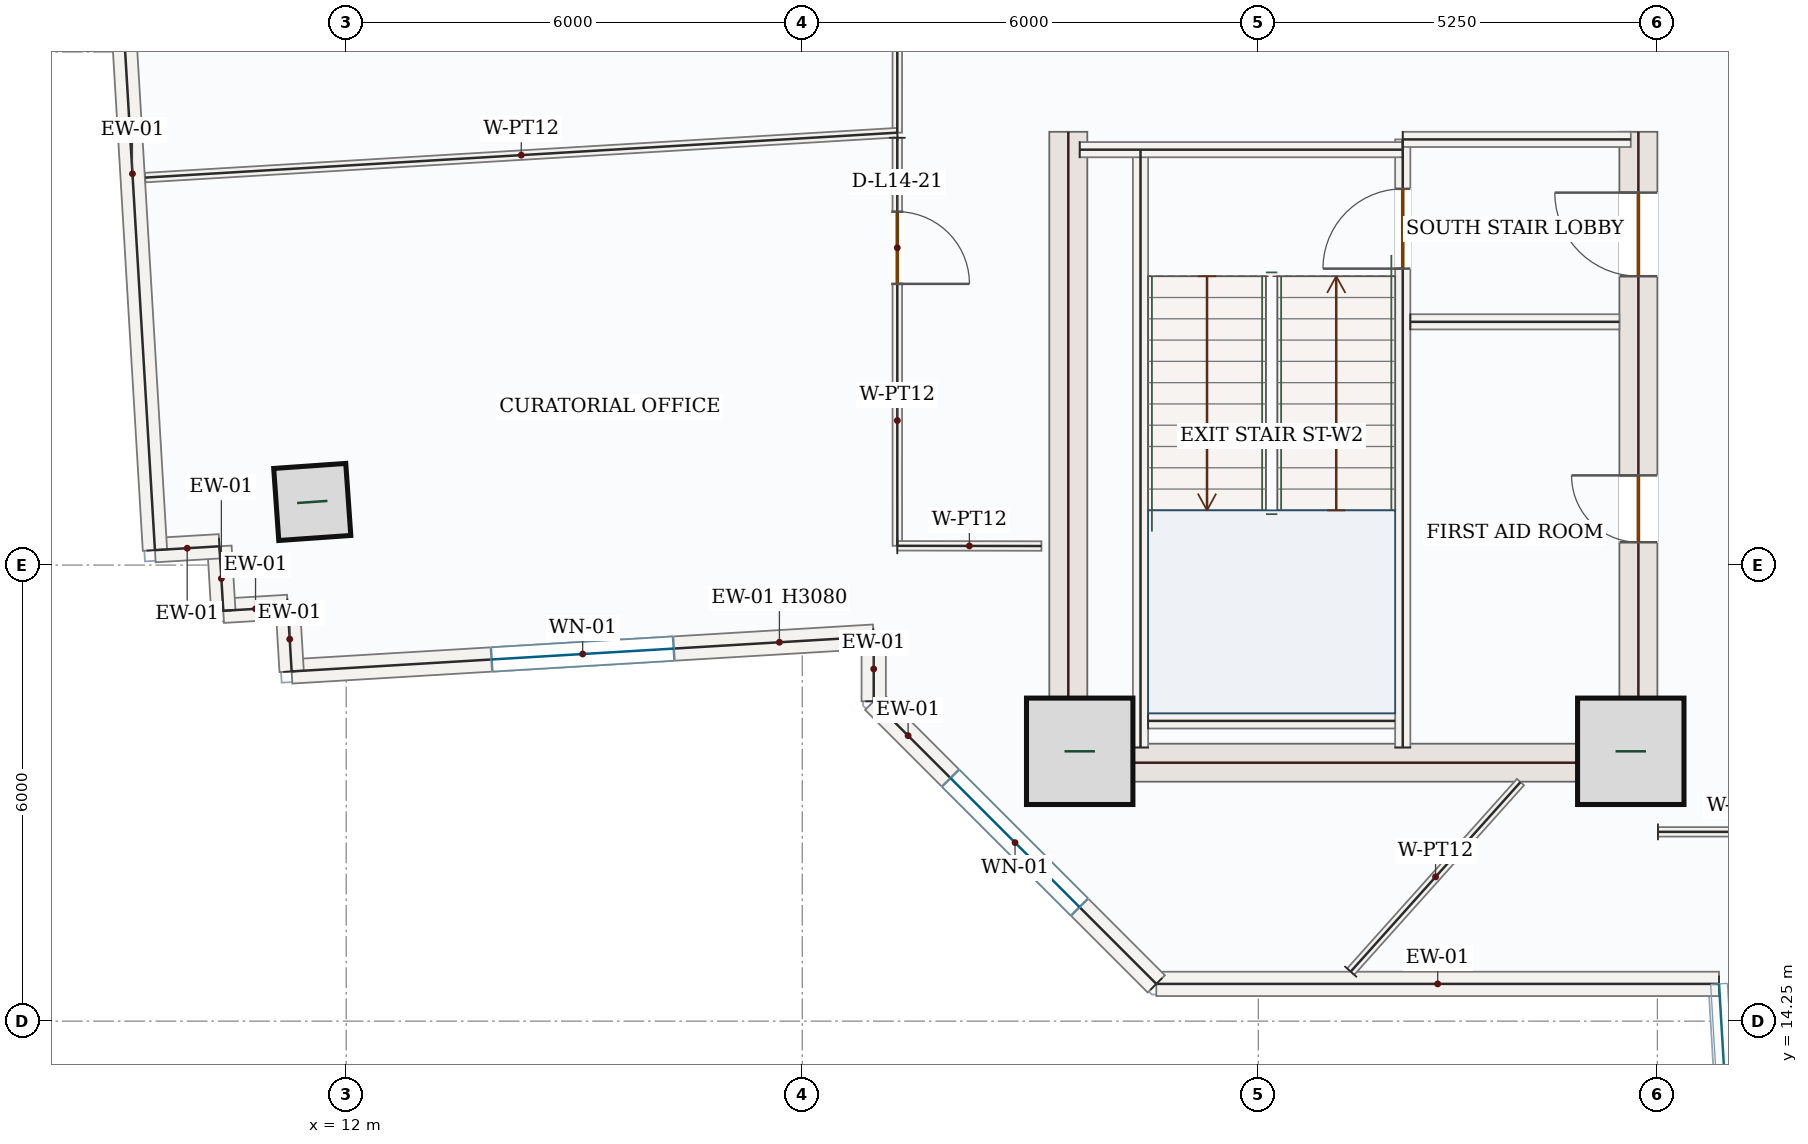
"""IFC4 building model, lengths in metres.
Left out: names, types, materials, properties, quantities, classifications, styles, units other than length and angle.
Written with IfcOpenShell. Run it as: python <this file> out.ifc"""

import sys

from ifc_helpers import new_model, si_unit, direction, frame, frame_2d, origin, origin_2d, place, context, subcontext, project, spatial, rectangle, hollow_rectangle, extrude, source, transform, mapped, element, fill, save


model = new_model("IFC4")
c1 = context("Model", 3, precision=1e-05, world=origin(), true_north=direction((0.0, 1.0)))
c2 = subcontext(c1, "Body", "Model", "MODEL_VIEW")
j1 = project(units=[si_unit("LENGTHUNIT", "METRE"), si_unit("PLANEANGLEUNIT", "RADIAN")], contexts=[c1])
p1 = place(None, origin())
s1 = spatial("IfcSite", under=j1, at=p1, CompositionType="ELEMENT")
p2 = place(p1, origin())
s2 = spatial("IfcBuilding", under=s1, at=p2, CompositionType="ELEMENT")
p3 = place(p2, frame((0.0, 0.0, 66.9)))
s3 = spatial("IfcBuildingStorey", under=s2, at=p3, CompositionType="ELEMENT", Elevation=66.9)
m1 = source(origin(), c2, "Body", "SweptSolid", [
    extrude(rectangle(XDim=8.55, YDim=0.5, at=frame_2d((4.275, 0.0))), origin(), (0.0, 0.0, 1.0), 3.95),
])
p4 = place(p3, frame((21.5, 17.4, 0.0), z_axis=(0.0, 0.0, 1.0), x_axis=(0.0, 1.0, 0.0)))
e1 = element("IfcWall", 1, at=p4, inside=s3, PredefinedType="SHEAR", context=c2, shape_type="MappedRepresentation", body=[
    mapped(m1, transform((0.0, 0.0, 0.0), x_axis=(1.0, 0.0, 0.0), y_axis=(0.0, 1.0, 0.0), z_axis=(0.0, 0.0, 1.0), scale=1.0)),
])
p5 = place(p3, frame((29.0, 17.4, 0.0), z_axis=(0.0, 0.0, 1.0), x_axis=(0.0, 1.0, 0.0)))
e2 = element("IfcWall", 2, at=p5, inside=s3, PredefinedType="SHEAR", context=c2, shape_type="SweptSolid", body=[
    extrude(rectangle(XDim=8.55, YDim=0.5, at=frame_2d((4.275, 0.0))), origin(), (0.0, 0.0, 1.0), 3.95),
])
p6 = place(p5, frame((6.65, 0.0, 0.0)))
e3 = element("IfcOpeningElement", 3, at=p6, cuts=e2, PredefinedType="OPENING", context=c2, shape_type="SweptSolid", body=[
    extrude(rectangle(XDim=1.1, YDim=2.2, at=frame_2d((0.55, 1.1))), frame((0.0, 0.26, 0.0), z_axis=(0.0, -1.0, 0.0), x_axis=(1.0, 0.0, 0.0)), (0.0, 0.0, 1.0), 0.52),
])
p7 = place(p5, frame((3.15, 0.0, 0.0)))
e4 = element("IfcOpeningElement", 4, at=p7, cuts=e2, PredefinedType="OPENING", context=c2, shape_type="SweptSolid", body=[
    extrude(rectangle(XDim=0.88, YDim=2.1, at=frame_2d((0.44, 1.05))), frame((0.0, 0.26, 0.0), z_axis=(0.0, -1.0, 0.0), x_axis=(1.0, 0.0, 0.0)), (0.0, 0.0, 1.0), 0.52),
])
m2 = source(origin(), c2, "Body", "SweptSolid", [
    extrude(rectangle(XDim=7.0, YDim=0.5, at=frame_2d((3.5, 0.0))), origin(), (0.0, 0.0, 1.0), 3.95),
])
p8 = place(p3, frame((21.75, 17.65, 0.0), z_axis=(0.0, 0.0, 1.0), x_axis=(1.0, 0.0, 0.0)))
e5 = element("IfcWall", 5, at=p8, inside=s3, PredefinedType="SHEAR", context=c2, shape_type="MappedRepresentation", body=[
    mapped(m2, transform((0.0, 0.0, 0.0), x_axis=(1.0, 0.0, 0.0), y_axis=(0.0, 1.0, 0.0), z_axis=(0.0, 0.0, 1.0), scale=1.0)),
])
m3 = source(origin(), c2, "Body", "SweptSolid", [
    extrude(rectangle(XDim=1.4, YDim=1.4, at=origin_2d()), origin(), (0.0, 0.0, 1.0), 4.2),
])
for number, where, z_axis, x_axis in (
    (6, (21.65, 17.8, 0.0), (0.0, 0.0, 1.0), (1.0, 0.0, 0.0)),
    (7, (28.9, 17.8, 0.0), (0.0, 0.0, 1.0), (1.0, 0.0, 0.0)),
):
    element("IfcColumn", number, at=place(p3, frame(where, z_axis=z_axis, x_axis=x_axis)), inside=s3, PredefinedType="COLUMN", context=c2, shape_type="MappedRepresentation", body=[
        mapped(m3, transform((0.0, 0.0, 0.0), x_axis=(1.0, 0.0, 0.0), y_axis=(0.0, 1.0, 0.0), z_axis=(0.0, 0.0, 1.0), scale=1.0)),
    ])
m4 = source(origin(), c2, "Body", "SweptSolid", [
    extrude(hollow_rectangle(XDim=0.95, YDim=0.95, WallThickness=0.05, at=origin_2d()), origin(), (0.0, 0.0, 1.0), 4.2),
])
p9 = place(p3, frame((11.553, 21.08, 0.0), z_axis=(0.0, 0.0, 1.0), x_axis=(0.99756405026, 0.069756473744, 0.0)))
e8 = element("IfcColumn", 8, at=p9, inside=s3, PredefinedType="COLUMN", context=c2, shape_type="MappedRepresentation", body=[
    mapped(m4, transform((0.0, 0.0, 0.0), x_axis=(1.0, 0.0, 0.0), y_axis=(0.0, 1.0, 0.0), z_axis=(0.0, 0.0, 1.0), scale=1.0)),
])
m5 = source(origin(), c2, "Body", "SweptSolid", [
    extrude(rectangle(XDim=7.403, YDim=0.32, at=frame_2d((3.701, 0.0))), origin(), (0.0, 0.0, 1.0), 3.95),
])
p10 = place(p3, frame((30.061, 14.74, 0.0), z_axis=(0.0, 0.0, 1.0), x_axis=(-1.0, 0.0, 0.0)))
e9 = element("IfcWall", 9, at=p10, inside=s3, PredefinedType="SOLIDWALL", context=c2, shape_type="MappedRepresentation", body=[
    mapped(m5, transform((0.0, 0.0, 0.0), x_axis=(1.0, 0.0, 0.0), y_axis=(0.0, 1.0, 0.0), z_axis=(0.0, 0.0, 1.0), scale=1.0)),
])
p11 = place(p3, frame((22.658, 14.74, 0.0), z_axis=(0.0, 0.0, 1.0), x_axis=(-0.707106781187, 0.707106781187, 0.0)))
e10 = element("IfcWall", 10, at=p11, inside=s3, PredefinedType="SOLIDWALL", context=c2, shape_type="SweptSolid", body=[
    extrude(rectangle(XDim=5.258, YDim=0.32, at=frame_2d((2.629, 0.0))), origin(), (0.0, 0.0, 1.0), 3.95),
])
p12 = place(p11, frame((1.429, 0.0, 0.85)))
e11 = element("IfcOpeningElement", 11, at=p12, cuts=e10, PredefinedType="OPENING", context=c2, shape_type="SweptSolid", body=[
    extrude(rectangle(XDim=2.4, YDim=1.8, at=frame_2d((1.2, 0.9))), frame((0.0, 0.17, 0.0), z_axis=(0.0, -1.0, 0.0), x_axis=(1.0, 0.0, 0.0)), (0.0, 0.0, 1.0), 0.34),
])
m6 = source(origin(), c2, "Body", "SweptSolid", [
    extrude(rectangle(XDim=0.851, YDim=0.32, at=frame_2d((0.425, 0.0))), origin(), (0.0, 0.0, 1.0), 3.95),
])
p13 = place(p3, frame((18.94, 18.458, 0.0), z_axis=(0.0, 0.0, 1.0), x_axis=(0.0, 1.0, 0.0)))
e12 = element("IfcWall", 12, at=p13, inside=s3, PredefinedType="SOLIDWALL", context=c2, shape_type="MappedRepresentation", body=[
    mapped(m6, transform((0.0, 0.0, 0.0), x_axis=(1.0, 0.0, 0.0), y_axis=(0.0, 1.0, 0.0), z_axis=(0.0, 0.0, 1.0), scale=1.0)),
])
p14 = place(p3, frame((18.94, 19.309, 0.0), z_axis=(0.0, 0.0, 1.0), x_axis=(-0.998218176762, -0.059669687296, 0.0)))
e13 = element("IfcWall", 13, at=p14, inside=s3, PredefinedType="SOLIDWALL", context=c2, shape_type="SweptSolid", body=[
    extrude(rectangle(XDim=7.672, YDim=0.32, at=frame_2d((3.836, 0.0))), origin(), (0.0, 0.0, 1.0), 3.08),
])
p15 = place(p14, frame((2.636, 0.0, 0.85)))
e14 = element("IfcOpeningElement", 14, at=p15, cuts=e13, PredefinedType="OPENING", context=c2, shape_type="SweptSolid", body=[
    extrude(rectangle(XDim=2.4, YDim=1.8, at=frame_2d((1.2, 0.9))), frame((0.0, 0.17, 0.0), z_axis=(0.0, -1.0, 0.0), x_axis=(1.0, 0.0, 0.0)), (0.0, 0.0, 1.0), 0.34),
])
m7 = source(origin(), c2, "Body", "SweptSolid", [
    extrude(rectangle(XDim=0.85, YDim=0.32, at=frame_2d((0.425, 0.0))), origin(), (0.0, 0.0, 1.0), 3.95),
])
for number, where, z_axis, x_axis in (
    (15, (11.282, 18.851, 0.0), (0.0, 0.0, 1.0), (-0.059, 0.998, 0.0)),
    (16, (11.231, 19.699, 0.0), (0.0, 0.0, 1.0), (-0.998, -0.06, 0.0)),
    (17, (10.383, 19.649, 0.0), (0.0, 0.0, 1.0), (-0.059, 0.998, 0.0)),
    (18, (10.332, 20.497, 0.0), (0.0, 0.0, 1.0), (-0.998, -0.06, 0.0)),
):
    element("IfcWall", number, at=place(p3, frame(where, z_axis=z_axis, x_axis=x_axis)), inside=s3, PredefinedType="SOLIDWALL", context=c2, shape_type="MappedRepresentation", body=[
        mapped(m7, transform((0.0, 0.0, 0.0), x_axis=(1.0, 0.0, 0.0), y_axis=(0.0, 1.0, 0.0), z_axis=(0.0, 0.0, 1.0), scale=1.0)),
    ])
m8 = source(origin(), c2, "Body", "SweptSolid", [
    extrude(rectangle(XDim=9.92, YDim=0.32, at=frame_2d((4.96, 0.0))), origin(), (0.0, 0.0, 1.0), 3.95),
])
p16 = place(p3, frame((9.484, 20.447, 0.0), z_axis=(0.0, 0.0, 1.0), x_axis=(-0.059656871726, 0.998218942745, 0.0)))
e19 = element("IfcWall", 19, at=p16, inside=s3, PredefinedType="SOLIDWALL", context=c2, shape_type="MappedRepresentation", body=[
    mapped(m8, transform((0.0, 0.0, 0.0), x_axis=(1.0, 0.0, 0.0), y_axis=(0.0, 1.0, 0.0), z_axis=(0.0, 0.0, 1.0), scale=1.0)),
])
m9 = source(origin(), c2, "Body", "SweptSolid", [
    extrude(rectangle(XDim=7.87, YDim=0.2, at=frame_2d((3.935, 0.0))), origin(), (0.0, 0.0, 1.0), 3.95),
])
p17 = place(p3, frame((22.45, 17.85, 0.0), z_axis=(0.0, 0.0, 1.0), x_axis=(0.0, 1.0, 0.0)))
e20 = element("IfcWall", 20, at=p17, inside=s3, PredefinedType="SOLIDWALL", context=c2, shape_type="MappedRepresentation", body=[
    mapped(m9, transform((0.0, 0.0, 0.0), x_axis=(1.0, 0.0, 0.0), y_axis=(0.0, 1.0, 0.0), z_axis=(0.0, 0.0, 1.0), scale=1.0)),
])
p18 = place(p3, frame((25.9, 17.85, 0.0), z_axis=(0.0, 0.0, 1.0), x_axis=(0.0, 1.0, 0.0)))
e21 = element("IfcWall", 21, at=p18, inside=s3, PredefinedType="SOLIDWALL", context=c2, shape_type="SweptSolid", body=[
    extrude(rectangle(XDim=8.0, YDim=0.2, at=frame_2d((4.0, 0.0))), origin(), (0.0, 0.0, 1.0), 3.95),
])
p19 = place(p18, frame((6.3, 0.0, 0.0)))
e22 = element("IfcOpeningElement", 22, at=p19, cuts=e21, PredefinedType="OPENING", context=c2, shape_type="SweptSolid", body=[
    extrude(rectangle(XDim=1.05, YDim=2.15, at=frame_2d((0.525, 1.075))), frame((0.0, 0.11, 0.0), z_axis=(0.0, -1.0, 0.0), x_axis=(1.0, 0.0, 0.0)), (0.0, 0.0, 1.0), 0.22),
])
m10 = source(origin(), c2, "Body", "SweptSolid", [
    extrude(rectangle(XDim=4.25, YDim=0.2, at=frame_2d((2.125, 0.0))), origin(), (0.0, 0.0, 1.0), 3.95),
])
p20 = place(p3, frame((21.65, 25.715, 0.0), z_axis=(0.0, 0.0, 1.0), x_axis=(1.0, 0.0, 0.0)))
e23 = element("IfcWall", 23, at=p20, inside=s3, PredefinedType="SOLIDWALL", context=c2, shape_type="MappedRepresentation", body=[
    mapped(m10, transform((0.0, 0.0, 0.0), x_axis=(1.0, 0.0, 0.0), y_axis=(0.0, 1.0, 0.0), z_axis=(0.0, 0.0, 1.0), scale=1.0)),
])
m11 = source(origin(), c2, "Body", "SweptSolid", [
    extrude(rectangle(XDim=3.0, YDim=0.2, at=frame_2d((1.5, 0.0))), origin(), (0.0, 0.0, 1.0), 3.95),
])
p21 = place(p3, frame((25.9, 25.85, 0.0), z_axis=(0.0, 0.0, 1.0), x_axis=(1.0, 0.0, 0.0)))
e24 = element("IfcWall", 24, at=p21, inside=s3, PredefinedType="SOLIDWALL", context=c2, shape_type="MappedRepresentation", body=[
    mapped(m11, transform((0.0, 0.0, 0.0), x_axis=(1.0, 0.0, 0.0), y_axis=(0.0, 1.0, 0.0), z_axis=(0.0, 0.0, 1.0), scale=1.0)),
])
m12 = source(origin(), c2, "Body", "SweptSolid", [
    extrude(rectangle(XDim=3.25, YDim=0.2, at=frame_2d((1.625, 0.0))), origin(), (0.0, 0.0, 1.0), 3.95),
])
p22 = place(p3, frame((22.55, 18.2, 0.0), z_axis=(0.0, 0.0, 1.0), x_axis=(1.0, 0.0, 0.0)))
e25 = element("IfcWall", 25, at=p22, inside=s3, PredefinedType="SOLIDWALL", context=c2, shape_type="MappedRepresentation", body=[
    mapped(m12, transform((0.0, 0.0, 0.0), x_axis=(1.0, 0.0, 0.0), y_axis=(0.0, 1.0, 0.0), z_axis=(0.0, 0.0, 1.0), scale=1.0)),
])
m13 = source(origin(), c2, "Body", "SweptSolid", [
    extrude(rectangle(XDim=2.75, YDim=0.2, at=frame_2d((1.375, 0.0))), origin(), (0.0, 0.0, 1.0), 3.95),
])
p23 = place(p3, frame((26.0, 23.45, 0.0), z_axis=(0.0, 0.0, 1.0), x_axis=(1.0, 0.0, 0.0)))
e26 = element("IfcWall", 26, at=p23, inside=s3, PredefinedType="SOLIDWALL", context=c2, shape_type="MappedRepresentation", body=[
    mapped(m13, transform((0.0, 0.0, 0.0), x_axis=(1.0, 0.0, 0.0), y_axis=(0.0, 1.0, 0.0), z_axis=(0.0, 0.0, 1.0), scale=1.0)),
])
p24 = place(p3, frame((29.258, 16.74, 0.0), z_axis=(0.0, 0.0, 1.0), x_axis=(0.999999998192, -6.0135907e-05, 0.0)))
e27 = element("IfcWall", 27, at=p24, inside=s3, PredefinedType="PARTITIONING", context=c2, shape_type="SweptSolid", body=[
    extrude(rectangle(XDim=4.06, YDim=0.125, at=frame_2d((2.03, 0.0))), origin(), (0.0, 0.0, 1.0), 3.95),
])
p25 = place(p24, frame((2.426, 0.0, 0.0)))
e28 = element("IfcOpeningElement", 28, at=p25, cuts=e27, PredefinedType="OPENING", context=c2, shape_type="SweptSolid", body=[
    extrude(rectangle(XDim=0.95, YDim=2.15, at=frame_2d((0.475, 1.075))), frame((0.0, 0.073, 0.0), z_axis=(0.0, -1.0, 0.0), x_axis=(1.0, 0.0, 0.0)), (0.0, 0.0, 1.0), 0.145),
])
m14 = source(origin(), c2, "Body", "SweptSolid", [
    extrude(rectangle(XDim=3.348, YDim=0.125, at=frame_2d((1.674, 0.0))), origin(), (0.0, 0.0, 1.0), 3.95),
])
p26 = place(p3, frame((25.215, 14.901, 0.0), z_axis=(0.0, 0.0, 1.0), x_axis=(0.667206176518, 0.74487308853, 0.0)))
e29 = element("IfcWall", 29, at=p26, inside=s3, PredefinedType="PARTITIONING", context=c2, shape_type="MappedRepresentation", body=[
    mapped(m14, transform((0.0, 0.0, 0.0), x_axis=(1.0, 0.0, 0.0), y_axis=(0.0, 1.0, 0.0), z_axis=(0.0, 0.0, 1.0), scale=1.0)),
])
p27 = place(p3, frame((19.253, 33.497, 0.0), z_axis=(0.0, 0.0, 1.0), x_axis=(-0.000355308612, -0.999999936878, 0.0)))
e30 = element("IfcWall", 30, at=p27, inside=s3, PredefinedType="PARTITIONING", context=c2, shape_type="SweptSolid", body=[
    extrude(rectangle(XDim=7.558, YDim=0.125, at=frame_2d((3.779, 0.0))), origin(), (0.0, 0.0, 1.0), 3.95),
])
p28 = place(p27, frame((5.155, 0.0, 0.0)))
e31 = element("IfcOpeningElement", 31, at=p28, cuts=e30, PredefinedType="OPENING", context=c2, shape_type="SweptSolid", body=[
    extrude(rectangle(XDim=0.95, YDim=2.15, at=frame_2d((0.475, 1.075))), frame((0.0, 0.073, 0.0), z_axis=(0.0, -1.0, 0.0), x_axis=(1.0, 0.0, 0.0)), (0.0, 0.0, 1.0), 0.145),
])
m15 = source(origin(), c2, "Body", "SweptSolid", [
    extrude(rectangle(XDim=9.911, YDim=0.125, at=frame_2d((4.956, 0.0))), origin(), (0.0, 0.0, 1.0), 3.95),
])
p29 = place(p3, frame((19.25, 25.939, 0.0), z_axis=(0.0, 0.0, 1.0), x_axis=(-0.998218808208, -0.05965912285, 0.0)))
e32 = element("IfcWall", 32, at=p29, inside=s3, PredefinedType="PARTITIONING", context=c2, shape_type="MappedRepresentation", body=[
    mapped(m15, transform((0.0, 0.0, 0.0), x_axis=(1.0, 0.0, 0.0), y_axis=(0.0, 1.0, 0.0), z_axis=(0.0, 0.0, 1.0), scale=1.0)),
])
p30 = place(p3, frame((19.25, 25.871, 0.0), z_axis=(0.0, 0.0, 1.0), x_axis=(9.0962841e-05, -0.999999995863, 0.0)))
e33 = element("IfcWall", 33, at=p30, inside=s3, PredefinedType="PARTITIONING", context=c2, shape_type="SweptSolid", body=[
    extrude(rectangle(XDim=5.368, YDim=0.125, at=frame_2d((2.684, 0.0))), origin(), (0.0, 0.0, 1.0), 3.95),
])
p31 = place(p30, frame((0.972, 0.0, 0.0)))
e34 = element("IfcOpeningElement", 34, at=p31, cuts=e33, PredefinedType="OPENING", context=c2, shape_type="SweptSolid", body=[
    extrude(rectangle(XDim=0.95, YDim=2.15, at=frame_2d((0.475, 1.075))), frame((0.0, 0.073, 0.0), z_axis=(0.0, -1.0, 0.0), x_axis=(1.0, 0.0, 0.0)), (0.0, 0.0, 1.0), 0.145),
])
m16 = source(origin(), c2, "Body", "SweptSolid", [
    extrude(rectangle(XDim=1.896, YDim=0.125, at=frame_2d((0.948, 0.0))), origin(), (0.0, 0.0, 1.0), 3.95),
])
p32 = place(p3, frame((19.25, 20.503, 0.0), z_axis=(0.0, 0.0, 1.0), x_axis=(0.999998806185, -0.001545195168, 0.0)))
e35 = element("IfcWall", 35, at=p32, inside=s3, PredefinedType="PARTITIONING", context=c2, shape_type="MappedRepresentation", body=[
    mapped(m16, transform((0.0, 0.0, 0.0), x_axis=(1.0, 0.0, 0.0), y_axis=(0.0, 1.0, 0.0), z_axis=(0.0, 0.0, 1.0), scale=1.0)),
])
m17 = source(origin(), c2, "Body", "SweptSolid", [
    extrude(rectangle(XDim=2.4, YDim=1.8, at=frame_2d((1.2, 0.9))), frame((0.0, 0.03, 0.0), z_axis=(0.0, -1.0, 0.0), x_axis=(1.0, 0.0, 0.0)), (0.0, 0.0, 1.0), 0.06),
])
p33 = place(p12, origin())
e36 = element("IfcWindow", 36, at=p33, inside=s3, PartitioningType="DOUBLE_PANEL_VERTICAL", PredefinedType="WINDOW", context=c2, shape_type="MappedRepresentation", body=[
    mapped(m17, transform((0.0, 0.0, 0.0), x_axis=(1.0, 0.0, 0.0), y_axis=(0.0, 1.0, 0.0), z_axis=(0.0, 0.0, 1.0), scale=1.0)),
])
fill(e11, e36)
p34 = place(p15, origin())
e37 = element("IfcWindow", 37, at=p34, inside=s3, PartitioningType="DOUBLE_PANEL_VERTICAL", PredefinedType="WINDOW", context=c2, shape_type="MappedRepresentation", body=[
    mapped(m17, transform((0.0, 0.0, 0.0), x_axis=(1.0, 0.0, 0.0), y_axis=(0.0, 1.0, 0.0), z_axis=(0.0, 0.0, 1.0), scale=1.0)),
])
fill(e14, e37)
m18 = source(origin(), c2, "Body", "SweptSolid", [
    extrude(rectangle(XDim=1.05, YDim=2.15, at=frame_2d((0.525, 1.075))), frame((0.0, 0.025, 0.0), z_axis=(0.0, -1.0, 0.0), x_axis=(1.0, 0.0, 0.0)), (0.0, 0.0, 1.0), 0.05),
])
p35 = place(p19, origin())
e38 = element("IfcDoor", 38, at=p35, inside=s3, OperationType="SINGLE_SWING_LEFT", PredefinedType="DOOR", context=c2, shape_type="MappedRepresentation", body=[
    mapped(m18, transform((0.0, 0.0, 0.0), x_axis=(1.0, 0.0, 0.0), y_axis=(0.0, 1.0, 0.0), z_axis=(0.0, 0.0, 1.0), scale=1.0)),
])
fill(e22, e38)
m19 = source(origin(), c2, "Body", "SweptSolid", [
    extrude(rectangle(XDim=1.1, YDim=2.2, at=frame_2d((0.55, 1.1))), frame((0.0, 0.025, 0.0), z_axis=(0.0, -1.0, 0.0), x_axis=(1.0, 0.0, 0.0)), (0.0, 0.0, 1.0), 0.05),
])
p36 = place(p6, origin())
e39 = element("IfcDoor", 39, at=p36, inside=s3, OperationType="SINGLE_SWING_RIGHT", PredefinedType="DOOR", context=c2, shape_type="MappedRepresentation", body=[
    mapped(m19, transform((0.0, 0.0, 0.0), x_axis=(1.0, 0.0, 0.0), y_axis=(0.0, 1.0, 0.0), z_axis=(0.0, 0.0, 1.0), scale=1.0)),
])
fill(e3, e39)
m20 = source(origin(), c2, "Body", "SweptSolid", [
    extrude(rectangle(XDim=0.88, YDim=2.1, at=frame_2d((0.44, 1.05))), frame((0.0, 0.025, 0.0), z_axis=(0.0, -1.0, 0.0), x_axis=(1.0, 0.0, 0.0)), (0.0, 0.0, 1.0), 0.05),
])
p37 = place(p7, origin())
e40 = element("IfcDoor", 40, at=p37, inside=s3, OperationType="SINGLE_SWING_RIGHT", PredefinedType="DOOR", context=c2, shape_type="MappedRepresentation", body=[
    mapped(m20, transform((0.0, 0.0, 0.0), x_axis=(1.0, 0.0, 0.0), y_axis=(0.0, 1.0, 0.0), z_axis=(0.0, 0.0, 1.0), scale=1.0)),
])
fill(e4, e40)
m21 = source(origin(), c2, "Body", "SweptSolid", [
    extrude(rectangle(XDim=0.95, YDim=2.15, at=frame_2d((0.475, 1.075))), frame((0.0, 0.025, 0.0), z_axis=(0.0, -1.0, 0.0), x_axis=(1.0, 0.0, 0.0)), (0.0, 0.0, 1.0), 0.05),
])
p38 = place(p31, origin())
e41 = element("IfcDoor", 41, at=p38, inside=s3, OperationType="SINGLE_SWING_RIGHT", PredefinedType="DOOR", context=c2, shape_type="MappedRepresentation", body=[
    mapped(m21, transform((0.0, 0.0, 0.0), x_axis=(1.0, 0.0, 0.0), y_axis=(0.0, 1.0, 0.0), z_axis=(0.0, 0.0, 1.0), scale=1.0)),
])
fill(e34, e41)
save(model, sys.argv[1])
